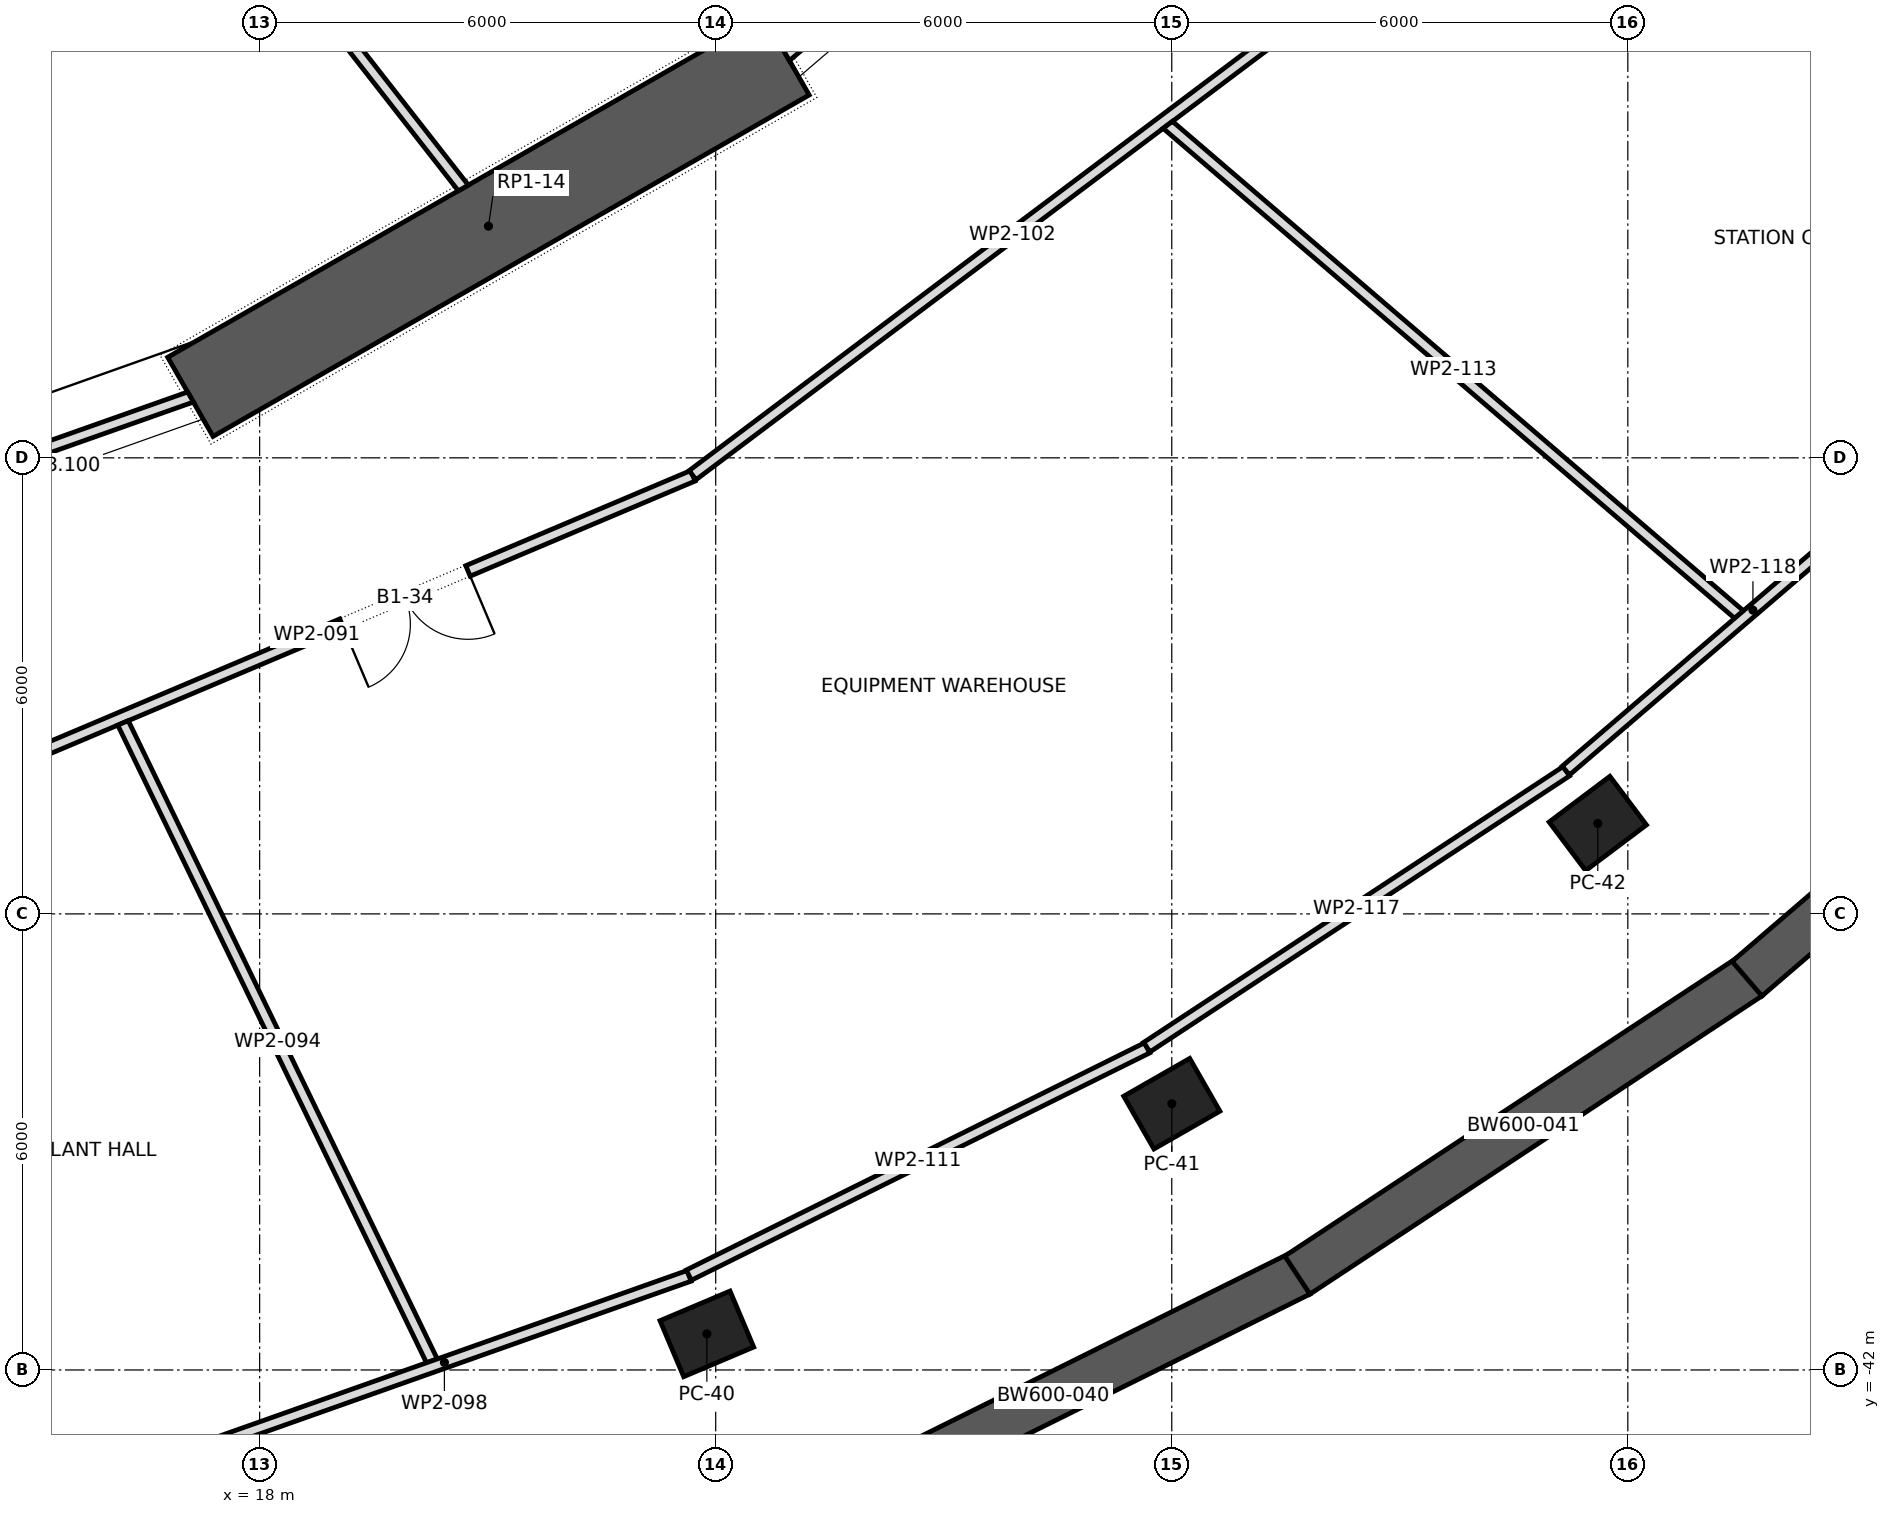
"""IFC4 building model, lengths in metres.
Left out: names, types, materials, properties, quantities, classifications, styles, units other than length and angle.
Written with IfcOpenShell. Run it as: python <this file> out.ifc"""

import sys

from ifc_helpers import new_model, si_unit, direction, frame, frame_2d, origin, origin_2d, place, context, subcontext, project, spatial, polyline, rectangle, outline, extrude, element, fill, save


model = new_model("IFC4")
c1 = context("Model", 3, precision=1e-05, world=origin(), true_north=direction((0.0, 1.0)))
c2 = subcontext(c1, "Body", "Model", "MODEL_VIEW")
j1 = project(units=[si_unit("LENGTHUNIT", "METRE"), si_unit("PLANEANGLEUNIT", "RADIAN")], contexts=[c1])
p1 = place(None, origin())
s1 = spatial("IfcSite", under=j1, at=p1, CompositionType="ELEMENT")
p2 = place(p1, origin())
s2 = spatial("IfcBuilding", under=s1, at=p2, CompositionType="ELEMENT")
p3 = place(p2, frame((0.0, 0.0, -4.0)))
s3 = spatial("IfcBuildingStorey", under=s2, at=p3, CompositionType="ELEMENT", Elevation=-4.0)
for number, where, z_axis, x_axis in (
    (1, (23.884, -41.525, 0.0), (0.0, 0.0, 1.0), (0.921, 0.389, 0.0)),
    (2, (30.001, -38.497, 0.0), (0.0, 0.0, 1.0), (0.868, 0.497, 0.0)),
    (3, (35.605, -34.81, 0.0), (0.0, 0.0, 1.0), (0.799, 0.601, 0.0)),
):
    element("IfcColumn", number, at=place(p3, frame(where, z_axis=z_axis, x_axis=x_axis)), inside=s3, PredefinedType="COLUMN", context=c2, shape_type="SweptSolid", body=[
        extrude(rectangle(XDim=1.0, YDim=0.8, at=origin_2d()), origin(), (0.0, 0.0, 1.0), 4.0),
    ])
p4 = place(p3, frame((17.089, -29.198, 0.0), z_axis=(0.0, 0.0, 1.0), x_axis=(0.867760656864, 0.496982336103, 0.0)))
e4 = element("IfcWall", 4, at=p4, inside=s3, PredefinedType="SHEAR", context=c2, shape_type="SweptSolid", body=[
    extrude(rectangle(XDim=9.038, YDim=1.2, at=frame_2d((4.519, 0.0))), origin(), (0.0, 0.0, 1.0), 4.0),
])
p5 = place(p3, frame((25.195, -43.955, 0.0), z_axis=(0.0, 0.0, 1.0), x_axis=(0.895750986496, 0.44455614965, 0.0)))
e5 = element("IfcWall", 5, at=p5, inside=s3, PredefinedType="SOLIDWALL", context=c2, shape_type="SweptSolid", body=[
    extrude(rectangle(XDim=7.245, YDim=0.6, at=frame_2d((3.623, 0.0))), origin(), (0.0, 0.0, 1.0), 4.0),
])
p6 = place(p3, frame((31.652, -40.752, 0.0), z_axis=(0.0, 0.0, 1.0), x_axis=(0.834745196239, 0.550636411215, 0.0)))
e6 = element("IfcWall", 6, at=p6, inside=s3, PredefinedType="SOLIDWALL", context=c2, shape_type="SweptSolid", body=[
    extrude(rectangle(XDim=7.124, YDim=0.6, at=frame_2d((3.562, 0.0))), origin(), (0.0, 0.0, 1.0), 4.0),
])
p7 = place(p3, frame((37.568, -36.853, 0.0), z_axis=(0.0, 0.0, 1.0), x_axis=(0.758319142722, 0.65188348482, 0.0)))
e7 = element("IfcWall", 7, at=p7, inside=s3, PredefinedType="SOLIDWALL", context=c2, shape_type="SweptSolid", body=[
    extrude(rectangle(XDim=6.991, YDim=0.6, at=frame_2d((3.496, 0.0))), origin(), (0.0, 0.0, 1.0), 4.0),
])
p8 = place(p3, frame((11.788, -15.074, 0.0), z_axis=(0.0, 0.0, 1.0), x_axis=(0.615848120598, -0.787864894735, 0.0)))
e8 = element("IfcWall", 8, at=p8, inside=s3, PredefinedType="PARTITIONING", context=c2, shape_type="SweptSolid", body=[
    extrude(outline(polyline([(0.0, -0.075), (14.428, -0.075), (14.449, 0.075), (0.0, 0.075), (0.0, -0.075)])), origin(), (0.0, 0.0, 1.0), 3.55),
])
p9 = place(p3, frame((11.967, -31.011, 0.0), z_axis=(0.0, 0.0, 1.0), x_axis=(0.942814385805, 0.333318217204, 0.0)))
e9 = element("IfcWall", 9, at=p9, inside=s3, PredefinedType="PARTITIONING", context=c2, shape_type="SweptSolid", body=[
    extrude(outline(polyline([(-0.013, -0.075), (5.448, -0.075), (5.421, 0.075), (0.013, 0.075), (-0.013, -0.075)])), origin(), (0.0, 0.0, 1.0), 3.1),
])
p10 = place(p3, frame((13.802, -34.421, 0.0), z_axis=(0.0, 0.0, 1.0), x_axis=(0.921072890143, 0.389390204094, 0.0)))
e10 = element("IfcWall", 10, at=p10, inside=s3, PredefinedType="PARTITIONING", context=c2, shape_type="SweptSolid", body=[
    extrude(rectangle(XDim=10.746, YDim=0.15, at=frame_2d((5.373, 0.0))), origin(), (0.0, 0.0, 1.0), 3.55),
])
p11 = place(p10, frame((5.733, 0.0, 0.0)))
e11 = element("IfcOpeningElement", 11, at=p11, cuts=e10, PredefinedType="OPENING", context=c2, shape_type="SweptSolid", body=[
    extrude(rectangle(XDim=1.8, YDim=2.1, at=frame_2d((0.9, 1.05))), frame((0.0, 0.087, 0.0), z_axis=(0.0, -1.0, 0.0), x_axis=(1.0, 0.0, 0.0)), (0.0, 0.0, 1.0), 0.174),
])
p12 = place(p3, frame((16.202, -33.487, 0.0), z_axis=(0.0, 0.0, 1.0), x_axis=(0.435783992342, -0.900051282994, 0.0)))
e12 = element("IfcWall", 12, at=p12, inside=s3, PredefinedType="PARTITIONING", context=c2, shape_type="SweptSolid", body=[
    extrude(outline(polyline([(-0.004, -0.075), (9.317, -0.075), (9.334, 0.075), (0.004, 0.075), (-0.004, -0.075)])), origin(), (0.0, 0.0, 1.0), 3.55),
])
p13 = place(p3, frame((17.211, -43.042, 0.0), z_axis=(0.0, 0.0, 1.0), x_axis=(0.94266330093, 0.333745263757, 0.0)))
e13 = element("IfcWall", 13, at=p13, inside=s3, PredefinedType="PARTITIONING", context=c2, shape_type="SweptSolid", body=[
    extrude(rectangle(XDim=6.832, YDim=0.15, at=frame_2d((3.416, 0.0))), origin(), (0.0, 0.0, 1.0), 3.55),
])
p14 = place(p3, frame((23.696, -30.228, 0.0), z_axis=(0.0, 0.0, 1.0), x_axis=(0.799195100787, 0.601071701944, 0.0)))
e14 = element("IfcWall", 14, at=p14, inside=s3, PredefinedType="PARTITIONING", context=c2, shape_type="SweptSolid", body=[
    extrude(rectangle(XDim=10.529, YDim=0.15, at=frame_2d((5.264, 0.0))), origin(), (0.0, 0.0, 1.0), 3.55),
])
p15 = place(p3, frame((24.932, -24.708, 0.0), z_axis=(0.0, 0.0, 1.0), x_axis=(0.760084552743, 0.649824185978, 0.0)))
e15 = element("IfcWall", 15, at=p15, inside=s3, PredefinedType="PARTITIONING", context=c2, shape_type="SweptSolid", body=[
    extrude(outline(polyline([(-0.014, -0.075), (5.09, -0.075), (5.06, 0.075), (0.014, 0.075), (-0.014, -0.075)])), origin(), (0.0, 0.0, 1.0), 3.1),
])
p16 = place(p3, frame((29.677, -37.762, 0.0), z_axis=(0.0, 0.0, 1.0), x_axis=(-0.895909442692, -0.444236727991, 0.0)))
e16 = element("IfcWall", 16, at=p16, inside=s3, PredefinedType="PARTITIONING", context=c2, shape_type="SweptSolid", body=[
    extrude(rectangle(XDim=6.731, YDim=0.15, at=frame_2d((3.365, 0.0))), origin(), (0.0, 0.0, 1.0), 3.55),
])
p17 = place(p3, frame((29.947, -25.619, 0.0), z_axis=(0.0, 0.0, 1.0), x_axis=(0.759265306208, -0.650781218836, 0.0)))
e17 = element("IfcWall", 17, at=p17, inside=s3, PredefinedType="PARTITIONING", context=c2, shape_type="SweptSolid", body=[
    extrude(outline(polyline([(-0.017, -0.075), (9.888, -0.075), (9.911, 0.075), (0.017, 0.075), (-0.017, -0.075)])), origin(), (0.0, 0.0, 1.0), 3.55),
])
p18 = place(p3, frame((35.191, -34.123, 0.0), z_axis=(0.0, 0.0, 1.0), x_axis=(-0.83553583791, -0.549435950378, 0.0)))
e18 = element("IfcWall", 18, at=p18, inside=s3, PredefinedType="PARTITIONING", context=c2, shape_type="SweptSolid", body=[
    extrude(rectangle(XDim=6.606, YDim=0.15, at=frame_2d((3.303, 0.0))), origin(), (0.0, 0.0, 1.0), 3.55),
])
p19 = place(p3, frame((35.185, -34.114, 0.0), z_axis=(0.0, 0.0, 1.0), x_axis=(0.759033312601, 0.651051787773, 0.0)))
e19 = element("IfcWall", 19, at=p19, inside=s3, PredefinedType="PARTITIONING", context=c2, shape_type="SweptSolid", body=[
    extrude(rectangle(XDim=6.484, YDim=0.15, at=frame_2d((3.242, 0.0))), origin(), (0.0, 0.0, 1.0), 3.55),
])
p20 = place(p11, frame((1.8, 0.0, 0.0), z_axis=(0.0, 0.0, 1.0), x_axis=(-1.0, 0.0, 0.0)))
e20 = element("IfcDoor", 20, at=p20, inside=s3, OperationType="DOUBLE_DOOR_SINGLE_SWING", PredefinedType="DOOR", context=c2, shape_type="SweptSolid", body=[
    extrude(rectangle(XDim=1.8, YDim=2.1, at=frame_2d((0.9, 1.05))), frame((0.0, 0.025, 0.0), z_axis=(0.0, -1.0, 0.0), x_axis=(1.0, 0.0, 0.0)), (0.0, 0.0, 1.0), 0.05),
])
fill(e11, e20)
save(model, sys.argv[1])
